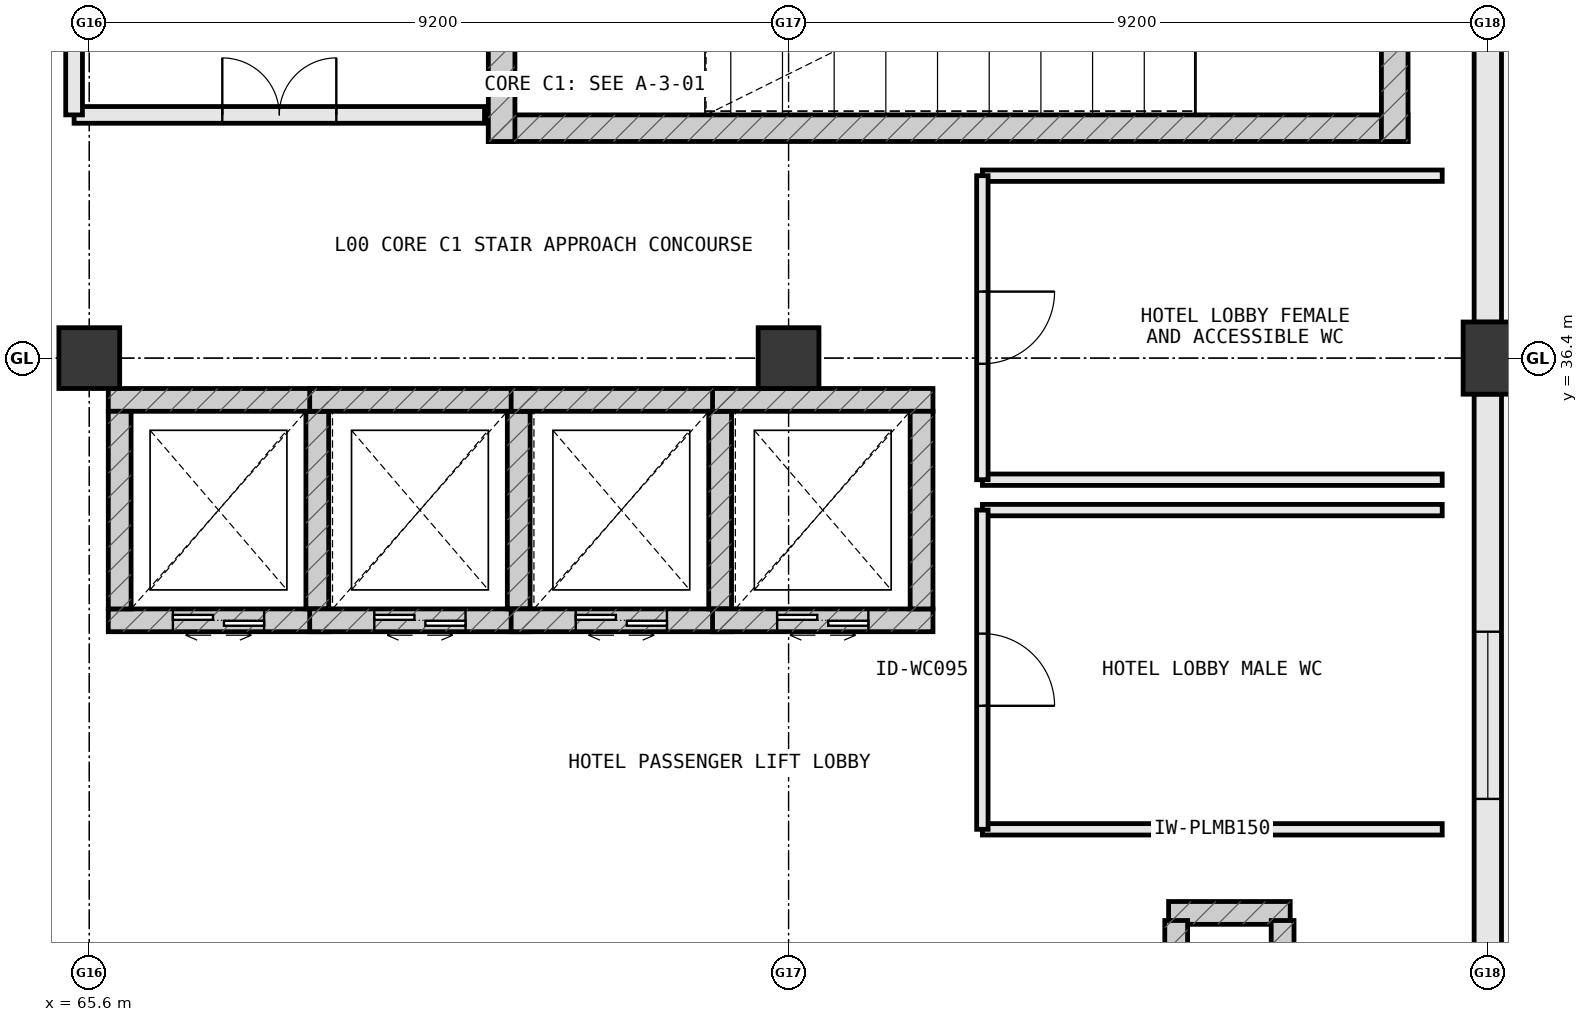
"""IFC4 building model, lengths in metres.
Left out: names, types, materials, properties, quantities, classifications, styles, units other than length and angle.
Written with IfcOpenShell. Run it as: python <this file> out.ifc"""

import sys

from ifc_helpers import new_model, si_unit, direction, frame, frame_2d, origin, origin_2d, place, context, subcontext, project, spatial, rectangle, extrude, element, fill, save


model = new_model("IFC4")
c1 = context("Model", 3, precision=1e-05, world=origin(), true_north=direction((0.0, 1.0)))
c2 = subcontext(c1, "Body", "Model", "MODEL_VIEW")
j1 = project(units=[si_unit("LENGTHUNIT", "METRE"), si_unit("PLANEANGLEUNIT", "RADIAN")], contexts=[c1])
p1 = place(None, origin())
s1 = spatial("IfcSite", under=j1, at=p1, CompositionType="ELEMENT")
p2 = place(p1, origin())
s2 = spatial("IfcBuilding", under=s1, at=p2, CompositionType="ELEMENT")
p3 = place(p2, origin())
s3 = spatial("IfcBuildingStorey", under=s2, at=p3, CompositionType="ELEMENT", Elevation=0.0)
p4 = place(p3, frame((74.8, 36.4, 0.0), z_axis=(0.0, 0.0, 1.0), x_axis=(1.0, 0.0, 0.0)))
e1 = element("IfcColumn", 1, at=p4, inside=s3, PredefinedType="COLUMN", context=c2, shape_type="SweptSolid", body=[
    extrude(rectangle(XDim=0.8, YDim=0.8, at=origin_2d()), origin(), (0.0, 0.0, 1.0), 5.4),
])
p5 = place(p3, frame((84.0, 36.4, 0.0), z_axis=(0.0, 0.0, 1.0), x_axis=(1.0, 0.0, 0.0)))
e2 = element("IfcColumn", 2, at=p5, inside=s3, PredefinedType="PILASTER", context=c2, shape_type="SweptSolid", body=[
    extrude(rectangle(XDim=0.65, YDim=0.95, at=origin_2d()), origin(), (0.0, 0.0, 1.0), 5.4),
])
p6 = place(p3, frame((65.6, 36.4, 0.0), z_axis=(0.0, 0.0, 1.0), x_axis=(1.0, 0.0, 0.0)))
e3 = element("IfcColumn", 3, at=p6, inside=s3, PredefinedType="COLUMN", context=c2, shape_type="SweptSolid", body=[
    extrude(rectangle(XDim=0.8, YDim=0.8, at=origin_2d()), origin(), (0.0, 0.0, 1.0), 5.4),
])
p7 = place(p3, frame((81.4, 29.1, 0.0), z_axis=(0.0, 0.0, 1.0), x_axis=(-1.0, 0.0, 0.0)))
e4 = element("IfcWall", 4, at=p7, inside=s3, PredefinedType="SHEAR", context=c2, shape_type="SweptSolid", body=[
    extrude(rectangle(XDim=1.6, YDim=0.3, at=frame_2d((0.8, 0.0))), origin(), (0.0, 0.0, 1.0), 5.12),
])
for number, where, z_axis, x_axis in (
    (5, (79.9, 29.0, 0.0), (0.0, 0.0, 1.0), (0.0, -1.0, 0.0)),
    (6, (81.3, 27.8, 0.0), (0.0, 0.0, 1.0), (0.0, 1.0, 0.0)),
):
    element("IfcWall", number, at=place(p3, frame(where, z_axis=z_axis, x_axis=x_axis)), inside=s3, PredefinedType="SHEAR", context=c2, shape_type="SweptSolid", body=[
        extrude(rectangle(XDim=1.2, YDim=0.3, at=frame_2d((0.6, 0.0))), origin(), (0.0, 0.0, 1.0), 5.12),
    ])
p8 = place(p3, frame((84.0, 27.473, 0.0), z_axis=(0.0, 0.0, 1.0), x_axis=(0.0, 1.0, 0.0)))
e7 = element("IfcWall", 7, at=p8, inside=s3, PredefinedType="STANDARD", context=c2, shape_type="SweptSolid", body=[
    extrude(rectangle(XDim=8.454, YDim=0.36, at=frame_2d((4.227, 0.0))), origin(), (0.0, 0.0, 1.0), 4.652),
])
p9 = place(p8, frame((3.127, 0.0, 0.85)))
e8 = element("IfcOpeningElement", 8, at=p9, cuts=e7, PredefinedType="OPENING", context=c2, shape_type="SweptSolid", body=[
    extrude(rectangle(XDim=2.2, YDim=2.0, at=frame_2d((1.1, 1.0))), frame((0.0, 0.192, 0.0), z_axis=(0.0, -1.0, 0.0), x_axis=(1.0, 0.0, 0.0)), (0.0, 0.0, 1.0), 0.384),
])
p10 = place(p3, frame((84.0, 36.873, 0.0), z_axis=(0.0, 0.0, 1.0), x_axis=(0.0, 1.0, 0.0)))
e9 = element("IfcWall", 9, at=p10, inside=s3, PredefinedType="STANDARD", context=c2, shape_type="SweptSolid", body=[
    extrude(rectangle(XDim=9.854, YDim=0.36, at=frame_2d((4.927, 0.0))), origin(), (0.0, 0.0, 1.0), 4.652),
])
p11 = place(p10, frame((6.291, 0.0, 0.85)))
e10 = element("IfcOpeningElement", 10, at=p11, cuts=e9, PredefinedType="OPENING", context=c2, shape_type="SweptSolid", body=[
    extrude(rectangle(XDim=2.2, YDim=2.0, at=frame_2d((1.1, 1.0))), frame((0.0, 0.192, 0.0), z_axis=(0.0, -1.0, 0.0), x_axis=(1.0, 0.0, 0.0)), (0.0, 0.0, 1.0), 0.384),
])
p12 = place(p3, frame((70.85, 39.425, 0.0), z_axis=(0.0, 0.0, 1.0), x_axis=(1.0, 0.0, 0.0)))
e11 = element("IfcWall", 11, at=p12, inside=s3, PredefinedType="SHEAR", context=c2, shape_type="SweptSolid", body=[
    extrude(rectangle(XDim=12.1, YDim=0.35, at=frame_2d((6.05, 0.0))), origin(), (0.0, 0.0, 1.0), 5.4),
])
p13 = place(p3, frame((82.775, 39.25, 0.0), z_axis=(0.0, 0.0, 1.0), x_axis=(0.0, 1.0, 0.0)))
e12 = element("IfcWall", 12, at=p13, inside=s3, PredefinedType="SHEAR", context=c2, shape_type="SweptSolid", body=[
    extrude(rectangle(XDim=5.1, YDim=0.35, at=frame_2d((2.55, 0.0))), origin(), (0.0, 0.0, 1.0), 5.4),
])
p14 = place(p3, frame((71.025, 44.35, 0.0), z_axis=(0.0, 0.0, 1.0), x_axis=(0.0, -1.0, 0.0)))
e13 = element("IfcWall", 13, at=p14, inside=s3, PredefinedType="SHEAR", context=c2, shape_type="SweptSolid", body=[
    extrude(rectangle(XDim=5.1, YDim=0.35, at=frame_2d((2.55, 0.0))), origin(), (0.0, 0.0, 1.0), 5.4),
])
p15 = place(p14, frame((2.0, 0.0, 0.0)))
e14 = element("IfcOpeningElement", 14, at=p15, cuts=e13, PredefinedType="OPENING", context=c2, shape_type="SweptSolid", body=[
    extrude(rectangle(XDim=1.1, YDim=2.2, at=frame_2d((0.55, 1.1))), frame((0.0, 0.187, 0.0), z_axis=(0.0, -1.0, 0.0), x_axis=(1.0, 0.0, 0.0)), (0.0, 0.0, 1.0), 0.374),
])
p16 = place(p3, frame((65.85, 32.95, 0.0), z_axis=(0.0, 0.0, 1.0), x_axis=(1.0, 0.0, 0.0)))
e15 = element("IfcWall", 15, at=p16, inside=s3, PredefinedType="SHEAR", context=c2, shape_type="SweptSolid", body=[
    extrude(rectangle(XDim=2.9, YDim=0.3, at=frame_2d((1.45, 0.0))), origin(), (0.0, 0.0, 1.0), 5.4),
])
p17 = place(p16, frame((0.85, 0.0, 0.0)))
e16 = element("IfcOpeningElement", 16, at=p17, cuts=e15, PredefinedType="OPENING", context=c2, shape_type="SweptSolid", body=[
    extrude(rectangle(XDim=1.2, YDim=2.2, at=frame_2d((0.6, 1.1))), frame((0.0, 0.162, 0.0), z_axis=(0.0, -1.0, 0.0), x_axis=(1.0, 0.0, 0.0)), (0.0, 0.0, 1.0), 0.324),
])
p18 = place(p3, frame((68.75, 35.85, 0.0), z_axis=(0.0, 0.0, 1.0), x_axis=(-1.0, 0.0, 0.0)))
e17 = element("IfcWall", 17, at=p18, inside=s3, PredefinedType="SHEAR", context=c2, shape_type="SweptSolid", body=[
    extrude(rectangle(XDim=2.9, YDim=0.3, at=frame_2d((1.45, 0.0))), origin(), (0.0, 0.0, 1.0), 5.4),
])
for number, where, z_axis, x_axis in (
    (18, (68.6, 33.1, 0.0), (0.0, 0.0, 1.0), (0.0, 1.0, 0.0)),
    (19, (66.0, 35.7, 0.0), (0.0, 0.0, 1.0), (0.0, -1.0, 0.0)),
):
    element("IfcWall", number, at=place(p3, frame(where, z_axis=z_axis, x_axis=x_axis)), inside=s3, PredefinedType="SHEAR", context=c2, shape_type="SweptSolid", body=[
        extrude(rectangle(XDim=2.6, YDim=0.3, at=frame_2d((1.3, 0.0))), origin(), (0.0, 0.0, 1.0), 5.4),
    ])
p19 = place(p3, frame((68.5, 32.95, 0.0), z_axis=(0.0, 0.0, 1.0), x_axis=(1.0, 0.0, 0.0)))
e20 = element("IfcWall", 20, at=p19, inside=s3, PredefinedType="SHEAR", context=c2, shape_type="SweptSolid", body=[
    extrude(rectangle(XDim=2.9, YDim=0.3, at=frame_2d((1.45, 0.0))), origin(), (0.0, 0.0, 1.0), 5.4),
])
p20 = place(p19, frame((0.85, 0.0, 0.0)))
e21 = element("IfcOpeningElement", 21, at=p20, cuts=e20, PredefinedType="OPENING", context=c2, shape_type="SweptSolid", body=[
    extrude(rectangle(XDim=1.2, YDim=2.2, at=frame_2d((0.6, 1.1))), frame((0.0, 0.162, 0.0), z_axis=(0.0, -1.0, 0.0), x_axis=(1.0, 0.0, 0.0)), (0.0, 0.0, 1.0), 0.324),
])
p21 = place(p3, frame((71.4, 35.85, 0.0), z_axis=(0.0, 0.0, 1.0), x_axis=(-1.0, 0.0, 0.0)))
e22 = element("IfcWall", 22, at=p21, inside=s3, PredefinedType="SHEAR", context=c2, shape_type="SweptSolid", body=[
    extrude(rectangle(XDim=2.9, YDim=0.3, at=frame_2d((1.45, 0.0))), origin(), (0.0, 0.0, 1.0), 5.4),
])
p22 = place(p3, frame((71.25, 33.1, 0.0), z_axis=(0.0, 0.0, 1.0), x_axis=(0.0, 1.0, 0.0)))
e23 = element("IfcWall", 23, at=p22, inside=s3, PredefinedType="SHEAR", context=c2, shape_type="SweptSolid", body=[
    extrude(rectangle(XDim=2.6, YDim=0.3, at=frame_2d((1.3, 0.0))), origin(), (0.0, 0.0, 1.0), 5.4),
])
p23 = place(p3, frame((71.15, 32.95, 0.0), z_axis=(0.0, 0.0, 1.0), x_axis=(1.0, 0.0, 0.0)))
e24 = element("IfcWall", 24, at=p23, inside=s3, PredefinedType="SHEAR", context=c2, shape_type="SweptSolid", body=[
    extrude(rectangle(XDim=2.9, YDim=0.3, at=frame_2d((1.45, 0.0))), origin(), (0.0, 0.0, 1.0), 5.4),
])
p24 = place(p23, frame((0.85, 0.0, 0.0)))
e25 = element("IfcOpeningElement", 25, at=p24, cuts=e24, PredefinedType="OPENING", context=c2, shape_type="SweptSolid", body=[
    extrude(rectangle(XDim=1.2, YDim=2.2, at=frame_2d((0.6, 1.1))), frame((0.0, 0.162, 0.0), z_axis=(0.0, -1.0, 0.0), x_axis=(1.0, 0.0, 0.0)), (0.0, 0.0, 1.0), 0.324),
])
p25 = place(p3, frame((74.05, 35.85, 0.0), z_axis=(0.0, 0.0, 1.0), x_axis=(-1.0, 0.0, 0.0)))
e26 = element("IfcWall", 26, at=p25, inside=s3, PredefinedType="SHEAR", context=c2, shape_type="SweptSolid", body=[
    extrude(rectangle(XDim=2.9, YDim=0.3, at=frame_2d((1.45, 0.0))), origin(), (0.0, 0.0, 1.0), 5.4),
])
p26 = place(p3, frame((73.9, 33.1, 0.0), z_axis=(0.0, 0.0, 1.0), x_axis=(0.0, 1.0, 0.0)))
e27 = element("IfcWall", 27, at=p26, inside=s3, PredefinedType="SHEAR", context=c2, shape_type="SweptSolid", body=[
    extrude(rectangle(XDim=2.6, YDim=0.3, at=frame_2d((1.3, 0.0))), origin(), (0.0, 0.0, 1.0), 5.4),
])
p27 = place(p3, frame((73.8, 32.95, 0.0), z_axis=(0.0, 0.0, 1.0), x_axis=(1.0, 0.0, 0.0)))
e28 = element("IfcWall", 28, at=p27, inside=s3, PredefinedType="SHEAR", context=c2, shape_type="SweptSolid", body=[
    extrude(rectangle(XDim=2.9, YDim=0.3, at=frame_2d((1.45, 0.0))), origin(), (0.0, 0.0, 1.0), 5.4),
])
p28 = place(p27, frame((0.85, 0.0, 0.0)))
e29 = element("IfcOpeningElement", 29, at=p28, cuts=e28, PredefinedType="OPENING", context=c2, shape_type="SweptSolid", body=[
    extrude(rectangle(XDim=1.2, YDim=2.2, at=frame_2d((0.6, 1.1))), frame((0.0, 0.162, 0.0), z_axis=(0.0, -1.0, 0.0), x_axis=(1.0, 0.0, 0.0)), (0.0, 0.0, 1.0), 0.324),
])
p29 = place(p3, frame((76.7, 35.85, 0.0), z_axis=(0.0, 0.0, 1.0), x_axis=(-1.0, 0.0, 0.0)))
e30 = element("IfcWall", 30, at=p29, inside=s3, PredefinedType="SHEAR", context=c2, shape_type="SweptSolid", body=[
    extrude(rectangle(XDim=2.9, YDim=0.3, at=frame_2d((1.45, 0.0))), origin(), (0.0, 0.0, 1.0), 5.4),
])
p30 = place(p3, frame((76.55, 33.1, 0.0), z_axis=(0.0, 0.0, 1.0), x_axis=(0.0, 1.0, 0.0)))
e31 = element("IfcWall", 31, at=p30, inside=s3, PredefinedType="SHEAR", context=c2, shape_type="SweptSolid", body=[
    extrude(rectangle(XDim=2.6, YDim=0.3, at=frame_2d((1.3, 0.0))), origin(), (0.0, 0.0, 1.0), 5.4),
])
p31 = place(p3, frame((65.4, 39.6, 0.0), z_axis=(0.0, 0.0, 1.0), x_axis=(1.0, 0.0, 0.0)))
e32 = element("IfcWall", 32, at=p31, inside=s3, PredefinedType="STANDARD", context=c2, shape_type="SweptSolid", body=[
    extrude(rectangle(XDim=5.4, YDim=0.22, at=frame_2d((2.7, 0.0))), origin(), (0.0, 0.0, 1.0), 5.12),
])
p32 = place(p31, frame((1.95, 0.0, 0.0)))
e33 = element("IfcOpeningElement", 33, at=p32, cuts=e32, PredefinedType="OPENING", context=c2, shape_type="SweptSolid", body=[
    extrude(rectangle(XDim=1.5, YDim=2.2, at=frame_2d((0.75, 1.1))), frame((0.0, 0.122, 0.0), z_axis=(0.0, -1.0, 0.0), x_axis=(1.0, 0.0, 0.0)), (0.0, 0.0, 1.0), 0.244),
])
p33 = place(p3, frame((65.4, 43.85, 0.0), z_axis=(0.0, 0.0, 1.0), x_axis=(0.0, -1.0, 0.0)))
e34 = element("IfcWall", 34, at=p33, inside=s3, PredefinedType="STANDARD", context=c2, shape_type="SweptSolid", body=[
    extrude(rectangle(XDim=4.25, YDim=0.22, at=frame_2d((2.125, 0.0))), origin(), (0.0, 0.0, 1.0), 5.12),
])
p34 = place(p33, frame((1.375, 0.0, 0.0)))
e35 = element("IfcOpeningElement", 35, at=p34, cuts=e34, PredefinedType="OPENING", context=c2, shape_type="SweptSolid", body=[
    extrude(rectangle(XDim=1.5, YDim=2.2, at=frame_2d((0.75, 1.1))), frame((0.0, 0.122, 0.0), z_axis=(0.0, -1.0, 0.0), x_axis=(1.0, 0.0, 0.0)), (0.0, 0.0, 1.0), 0.244),
])
for number, where, z_axis, x_axis in (
    (36, (77.35, 30.2, 0.0), (0.0, 0.0, 1.0), (1.0, 0.0, 0.0)),
    (37, (83.4, 34.4, 0.0), (0.0, 0.0, 1.0), (-1.0, 0.0, 0.0)),
):
    element("IfcWall", number, at=place(p3, frame(where, z_axis=z_axis, x_axis=x_axis)), inside=s3, PredefinedType="PLUMBINGWALL", context=c2, shape_type="SweptSolid", body=[
        extrude(rectangle(XDim=6.05, YDim=0.15, at=frame_2d((3.025, 0.0))), origin(), (0.0, 0.0, 1.0), 5.12),
    ])
p35 = place(p3, frame((77.35, 34.4, 0.0), z_axis=(0.0, 0.0, 1.0), x_axis=(0.0, -1.0, 0.0)))
e38 = element("IfcWall", 38, at=p35, inside=s3, PredefinedType="PLUMBINGWALL", context=c2, shape_type="SweptSolid", body=[
    extrude(rectangle(XDim=4.2, YDim=0.15, at=frame_2d((2.1, 0.0))), origin(), (0.0, 0.0, 1.0), 5.12),
])
p36 = place(p35, frame((1.625, 0.0, 0.0)))
e39 = element("IfcOpeningElement", 39, at=p36, cuts=e38, PredefinedType="OPENING", context=c2, shape_type="SweptSolid", body=[
    extrude(rectangle(XDim=0.95, YDim=2.15, at=frame_2d((0.475, 1.075))), frame((0.0, 0.087, 0.0), z_axis=(0.0, -1.0, 0.0), x_axis=(1.0, 0.0, 0.0)), (0.0, 0.0, 1.0), 0.174),
])
for number, where, z_axis, x_axis in (
    (40, (77.35, 34.8, 0.0), (0.0, 0.0, 1.0), (1.0, 0.0, 0.0)),
    (41, (83.4, 38.8, 0.0), (0.0, 0.0, 1.0), (-1.0, 0.0, 0.0)),
):
    element("IfcWall", number, at=place(p3, frame(where, z_axis=z_axis, x_axis=x_axis)), inside=s3, PredefinedType="PLUMBINGWALL", context=c2, shape_type="SweptSolid", body=[
        extrude(rectangle(XDim=6.05, YDim=0.15, at=frame_2d((3.025, 0.0))), origin(), (0.0, 0.0, 1.0), 5.12),
    ])
p37 = place(p3, frame((77.35, 38.8, 0.0), z_axis=(0.0, 0.0, 1.0), x_axis=(0.0, -1.0, 0.0)))
e42 = element("IfcWall", 42, at=p37, inside=s3, PredefinedType="PLUMBINGWALL", context=c2, shape_type="SweptSolid", body=[
    extrude(rectangle(XDim=4.0, YDim=0.15, at=frame_2d((2.0, 0.0))), origin(), (0.0, 0.0, 1.0), 5.12),
])
p38 = place(p37, frame((1.525, 0.0, 0.0)))
e43 = element("IfcOpeningElement", 43, at=p38, cuts=e42, PredefinedType="OPENING", context=c2, shape_type="SweptSolid", body=[
    extrude(rectangle(XDim=0.95, YDim=2.15, at=frame_2d((0.475, 1.075))), frame((0.0, 0.087, 0.0), z_axis=(0.0, -1.0, 0.0), x_axis=(1.0, 0.0, 0.0)), (0.0, 0.0, 1.0), 0.174),
])
p39 = place(p9, origin())
e44 = element("IfcWindow", 44, at=p39, inside=s3, PartitioningType="DOUBLE_PANEL_VERTICAL", PredefinedType="WINDOW", context=c2, shape_type="SweptSolid", body=[
    extrude(rectangle(XDim=2.2, YDim=2.0, at=frame_2d((1.1, 1.0))), frame((0.0, 0.03, 0.0), z_axis=(0.0, -1.0, 0.0), x_axis=(1.0, 0.0, 0.0)), (0.0, 0.0, 1.0), 0.06),
])
fill(e8, e44)
p40 = place(p17, origin())
e45 = element("IfcDoor", 45, at=p40, inside=s3, OperationType="DOUBLE_DOOR_SLIDING", PredefinedType="DOOR", context=c2, shape_type="SweptSolid", body=[
    extrude(rectangle(XDim=1.2, YDim=2.2, at=frame_2d((0.6, 1.1))), frame((0.0, 0.025, 0.0), z_axis=(0.0, -1.0, 0.0), x_axis=(1.0, 0.0, 0.0)), (0.0, 0.0, 1.0), 0.05),
])
fill(e16, e45)
p41 = place(p20, origin())
e46 = element("IfcDoor", 46, at=p41, inside=s3, OperationType="DOUBLE_DOOR_SLIDING", PredefinedType="DOOR", context=c2, shape_type="SweptSolid", body=[
    extrude(rectangle(XDim=1.2, YDim=2.2, at=frame_2d((0.6, 1.1))), frame((0.0, 0.025, 0.0), z_axis=(0.0, -1.0, 0.0), x_axis=(1.0, 0.0, 0.0)), (0.0, 0.0, 1.0), 0.05),
])
fill(e21, e46)
p42 = place(p24, origin())
e47 = element("IfcDoor", 47, at=p42, inside=s3, OperationType="DOUBLE_DOOR_SLIDING", PredefinedType="DOOR", context=c2, shape_type="SweptSolid", body=[
    extrude(rectangle(XDim=1.2, YDim=2.2, at=frame_2d((0.6, 1.1))), frame((0.0, 0.025, 0.0), z_axis=(0.0, -1.0, 0.0), x_axis=(1.0, 0.0, 0.0)), (0.0, 0.0, 1.0), 0.05),
])
fill(e25, e47)
p43 = place(p28, origin())
e48 = element("IfcDoor", 48, at=p43, inside=s3, OperationType="DOUBLE_DOOR_SLIDING", PredefinedType="DOOR", context=c2, shape_type="SweptSolid", body=[
    extrude(rectangle(XDim=1.2, YDim=2.2, at=frame_2d((0.6, 1.1))), frame((0.0, 0.025, 0.0), z_axis=(0.0, -1.0, 0.0), x_axis=(1.0, 0.0, 0.0)), (0.0, 0.0, 1.0), 0.05),
])
fill(e29, e48)
p44 = place(p32, origin())
e49 = element("IfcDoor", 49, at=p44, inside=s3, OperationType="DOUBLE_DOOR_SINGLE_SWING", PredefinedType="DOOR", context=c2, shape_type="SweptSolid", body=[
    extrude(rectangle(XDim=1.5, YDim=2.2, at=frame_2d((0.75, 1.1))), frame((0.0, 0.025, 0.0), z_axis=(0.0, -1.0, 0.0), x_axis=(1.0, 0.0, 0.0)), (0.0, 0.0, 1.0), 0.05),
])
fill(e33, e49)
p45 = place(p36, origin())
e50 = element("IfcDoor", 50, at=p45, inside=s3, OperationType="SINGLE_SWING_RIGHT", PredefinedType="DOOR", context=c2, shape_type="SweptSolid", body=[
    extrude(rectangle(XDim=0.95, YDim=2.15, at=frame_2d((0.475, 1.075))), frame((0.0, 0.025, 0.0), z_axis=(0.0, -1.0, 0.0), x_axis=(1.0, 0.0, 0.0)), (0.0, 0.0, 1.0), 0.05),
])
fill(e39, e50)
p46 = place(p38, origin())
e51 = element("IfcDoor", 51, at=p46, inside=s3, OperationType="SINGLE_SWING_LEFT", PredefinedType="DOOR", context=c2, shape_type="SweptSolid", body=[
    extrude(rectangle(XDim=0.95, YDim=2.15, at=frame_2d((0.475, 1.075))), frame((0.0, 0.025, 0.0), z_axis=(0.0, -1.0, 0.0), x_axis=(1.0, 0.0, 0.0)), (0.0, 0.0, 1.0), 0.05),
])
fill(e43, e51)
save(model, sys.argv[1])
